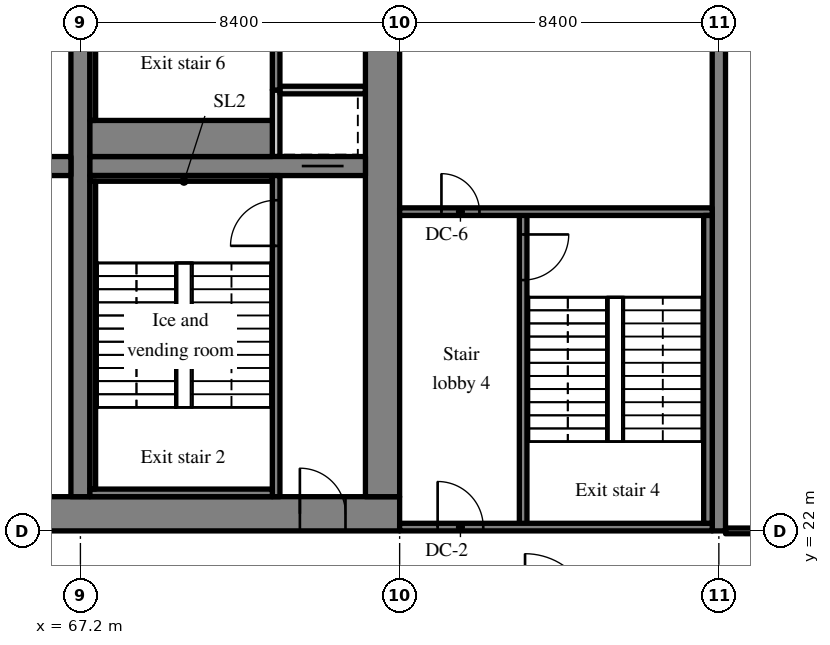
"""IFC4 building model, lengths in metres.
Left out: names, types, materials, properties, quantities, classifications, styles, units other than length and angle.
Written with IfcOpenShell. Run it as: python <this file> out.ifc"""

import sys

from ifc_helpers import new_model, si_unit, direction, frame, frame_2d, origin, place, context, subcontext, project, spatial, rectangle, extrude, source, transform, mapped, element, fill, save


model = new_model("IFC4")
c1 = context("Model", 3, precision=1e-05, world=origin(), true_north=direction((0.0, 1.0)))
c2 = subcontext(c1, "Body", "Model", "MODEL_VIEW")
j1 = project(units=[si_unit("LENGTHUNIT", "METRE"), si_unit("PLANEANGLEUNIT", "RADIAN")], contexts=[c1])
p1 = place(None, origin())
s1 = spatial("IfcSite", under=j1, at=p1, CompositionType="ELEMENT")
p2 = place(p1, origin())
s2 = spatial("IfcBuilding", under=s1, at=p2, CompositionType="ELEMENT")
p3 = place(p2, frame((0.0, 0.0, 86.4)))
s3 = spatial("IfcBuildingStorey", under=s2, at=p3, CompositionType="ELEMENT", Elevation=86.4)
m1 = source(origin(), c2, "Body", "SweptSolid", [
    extrude(rectangle(XDim=50.4, YDim=0.9, at=frame_2d((25.2, 0.0))), origin(), (0.0, 0.0, 1.0), 4.72),
])
p4 = place(p3, frame((25.2, 22.45, 0.0), z_axis=(0.0, 0.0, 1.0), x_axis=(1.0, 0.0, 0.0)))
e1 = element("IfcWall", 1, at=p4, inside=s3, PredefinedType="SHEAR", context=c2, shape_type="MappedRepresentation", body=[
    mapped(m1, transform((0.0, 0.0, 0.0), scale=1.0)),
])
m2 = source(origin(), c2, "Body", "SweptSolid", [
    extrude(rectangle(XDim=1.8, YDim=2.1, at=frame_2d((0.9, 1.05))), frame((0.0, 0.46, 0.0), z_axis=(0.0, -1.0, 0.0), x_axis=(1.0, 0.0, 0.0)), (0.0, 0.0, 1.0), 0.92),
])
p5 = place(p4, frame((15.9, 0.0, 0.0)))
e2 = element("IfcOpeningElement", 2, at=p5, cuts=e1, PredefinedType="OPENING", context=c2, shape_type="MappedRepresentation", body=[
    mapped(m2, transform((0.0, 0.0, 0.0), scale=1.0)),
])
m3 = source(origin(), c2, "Body", "SweptSolid", [
    extrude(rectangle(XDim=1.2, YDim=2.1, at=frame_2d((0.6, 1.05))), frame((0.0, 0.46, 0.0), z_axis=(0.0, -1.0, 0.0), x_axis=(1.0, 0.0, 0.0)), (0.0, 0.0, 1.0), 0.92),
])
p6 = place(p4, frame((26.975, 0.0, 0.0)))
e3 = element("IfcOpeningElement", 3, at=p6, cuts=e1, PredefinedType="OPENING", context=c2, shape_type="MappedRepresentation", body=[
    mapped(m3, transform((0.0, 0.0, 0.0), scale=1.0)),
])
m4 = source(origin(), c2, "Body", "SweptSolid", [
    extrude(rectangle(XDim=0.9, YDim=2.1, at=frame_2d((0.45, 1.05))), frame((0.0, 0.46, 0.0), z_axis=(0.0, -1.0, 0.0), x_axis=(1.0, 0.0, 0.0)), (0.0, 0.0, 1.0), 0.92),
])
p7 = place(p4, frame((34.5, 0.0, 0.0)))
e4 = element("IfcOpeningElement", 4, at=p7, cuts=e1, PredefinedType="OPENING", context=c2, shape_type="MappedRepresentation", body=[
    mapped(m4, transform((0.0, 0.0, 0.0), scale=1.0)),
])
p8 = place(p4, frame((31.5, 0.0, 0.0)))
e5 = element("IfcOpeningElement", 5, at=p8, cuts=e1, PredefinedType="OPENING", context=c2, shape_type="MappedRepresentation", body=[
    mapped(m4, transform((0.0, 0.0, 0.0), scale=1.0)),
])
p9 = place(p4, frame((39.788, 0.0, 0.0)))
e6 = element("IfcOpeningElement", 6, at=p9, cuts=e1, PredefinedType="OPENING", context=c2, shape_type="MappedRepresentation", body=[
    mapped(m4, transform((0.0, 0.0, 0.0), scale=1.0)),
])
p10 = place(p4, frame((36.762, 0.0, 0.0)))
e7 = element("IfcOpeningElement", 7, at=p10, cuts=e1, PredefinedType="OPENING", context=c2, shape_type="MappedRepresentation", body=[
    mapped(m4, transform((0.0, 0.0, 0.0), scale=1.0)),
])
p11 = place(p4, frame((6.45, 0.0, 0.0)))
e8 = element("IfcOpeningElement", 8, at=p11, cuts=e1, PredefinedType="OPENING", context=c2, shape_type="MappedRepresentation", body=[
    mapped(m3, transform((0.0, 0.0, 0.0), scale=1.0)),
])
p12 = place(p4, frame((47.775, 0.0, 0.0)))
e9 = element("IfcOpeningElement", 9, at=p12, cuts=e1, PredefinedType="OPENING", context=c2, shape_type="MappedRepresentation", body=[
    mapped(m3, transform((0.0, 0.0, 0.0), scale=1.0)),
])
m5 = source(origin(), c2, "Body", "SweptSolid", [
    extrude(rectangle(XDim=18.2, YDim=0.9, at=frame_2d((9.1, 0.0))), origin(), (0.0, 0.0, 1.0), 4.72),
])
p13 = place(p3, frame((75.15, 22.9, 0.0), z_axis=(0.0, 0.0, 1.0), x_axis=(0.0, 1.0, 0.0)))
e10 = element("IfcWall", 10, at=p13, inside=s3, PredefinedType="SHEAR", context=c2, shape_type="MappedRepresentation", body=[
    mapped(m5, transform((0.0, 0.0, 0.0), scale=1.0)),
])
p14 = place(p13, frame((12.5, 0.0, 0.0)))
e11 = element("IfcOpeningElement", 11, at=p14, cuts=e10, PredefinedType="OPENING", context=c2, shape_type="MappedRepresentation", body=[
    mapped(m3, transform((0.0, 0.0, 0.0), scale=1.0)),
])
m6 = source(origin(), c2, "Body", "SweptSolid", [
    extrude(rectangle(XDim=18.2, YDim=0.5, at=frame_2d((9.1, 0.0))), origin(), (0.0, 0.0, 1.0), 4.72),
])
p15 = place(p3, frame((67.2, 22.9, 0.0), z_axis=(0.0, 0.0, 1.0), x_axis=(0.0, 1.0, 0.0)))
e12 = element("IfcWall", 12, at=p15, inside=s3, PredefinedType="SHEAR", context=c2, shape_type="MappedRepresentation", body=[
    mapped(m6, transform((0.0, 0.0, 0.0), scale=1.0)),
])
m7 = source(origin(), c2, "Body", "SweptSolid", [
    extrude(rectangle(XDim=16.3, YDim=0.5, at=frame_2d((8.15, 0.0))), origin(), (0.0, 0.0, 1.0), 4.72),
])
p16 = place(p3, frame((50.65, 31.6, 0.0), z_axis=(0.0, 0.0, 1.0), x_axis=(1.0, 0.0, 0.0)))
e13 = element("IfcWall", 13, at=p16, inside=s3, PredefinedType="SHEAR", context=c2, shape_type="MappedRepresentation", body=[
    mapped(m7, transform((0.0, 0.0, 0.0), scale=1.0)),
])
m8 = source(origin(), c2, "Body", "SweptSolid", [
    extrude(rectangle(XDim=1.0, YDim=2.1, at=frame_2d((0.5, 1.05))), frame((0.0, 0.26, 0.0), z_axis=(0.0, -1.0, 0.0), x_axis=(1.0, 0.0, 0.0)), (0.0, 0.0, 1.0), 0.52),
])
p17 = place(p16, frame((0.575, 0.0, 0.0)))
e14 = element("IfcOpeningElement", 14, at=p17, cuts=e13, PredefinedType="OPENING", context=c2, shape_type="MappedRepresentation", body=[
    mapped(m8, transform((0.0, 0.0, 0.0), scale=1.0)),
])
m9 = source(origin(), c2, "Body", "SweptSolid", [
    extrude(rectangle(XDim=7.25, YDim=0.5, at=frame_2d((3.625, 0.0))), origin(), (0.0, 0.0, 1.0), 4.72),
])
p18 = place(p3, frame((67.45, 31.6, 0.0), z_axis=(0.0, 0.0, 1.0), x_axis=(1.0, 0.0, 0.0)))
e15 = element("IfcWall", 15, at=p18, inside=s3, PredefinedType="SHEAR", context=c2, shape_type="MappedRepresentation", body=[
    mapped(m9, transform((0.0, 0.0, 0.0), scale=1.0)),
])
m10 = source(origin(), c2, "Body", "SweptSolid", [
    extrude(rectangle(XDim=1.1, YDim=2.1, at=frame_2d((0.55, 1.05))), frame((0.0, 0.26, 0.0), z_axis=(0.0, -1.0, 0.0), x_axis=(1.0, 0.0, 0.0)), (0.0, 0.0, 1.0), 0.52),
])
p19 = place(p18, frame((5.575, 0.0, 0.0)))
e16 = element("IfcOpeningElement", 16, at=p19, cuts=e15, PredefinedType="OPENING", context=c2, shape_type="MappedRepresentation", body=[
    mapped(m10, transform((0.0, 0.0, 0.0), scale=1.0)),
])
m11 = source(origin(), c2, "Body", "SweptSolid", [
    extrude(rectangle(XDim=20.0, YDim=0.35, at=frame_2d((10.0, 0.0))), origin(), (0.0, 0.0, 1.0), 4.72),
])
p20 = place(p3, frame((84.0, 22.0, 0.0), z_axis=(0.0, 0.0, 1.0), x_axis=(0.0, 1.0, 0.0)))
e17 = element("IfcWall", 17, at=p20, inside=s3, PredefinedType="SHEAR", context=c2, shape_type="MappedRepresentation", body=[
    mapped(m11, transform((0.0, 0.0, 0.0), scale=1.0)),
])
m12 = source(origin(), c2, "Body", "SweptSolid", [
    extrude(rectangle(XDim=8.45, YDim=0.2, at=frame_2d((4.225, 0.0))), origin(), (0.0, 0.0, 1.0), 4.72),
])
p21 = place(p3, frame((72.35, 22.9, 0.0), z_axis=(0.0, 0.0, 1.0), x_axis=(0.0, 1.0, 0.0)))
e18 = element("IfcWall", 18, at=p21, inside=s3, PredefinedType="SOLIDWALL", context=c2, shape_type="MappedRepresentation", body=[
    mapped(m12, transform((0.0, 0.0, 0.0), scale=1.0)),
])
m13 = source(origin(), c2, "Body", "SweptSolid", [
    extrude(rectangle(XDim=1.2, YDim=2.1, at=frame_2d((0.6, 1.05))), frame((0.0, 0.11, 0.0), z_axis=(0.0, -1.0, 0.0), x_axis=(1.0, 0.0, 0.0)), (0.0, 0.0, 1.0), 0.22),
])
p22 = place(p21, frame((6.6, 0.0, 0.0)))
e19 = element("IfcOpeningElement", 19, at=p22, cuts=e18, PredefinedType="OPENING", context=c2, shape_type="MappedRepresentation", body=[
    mapped(m13, transform((0.0, 0.0, 0.0), scale=1.0)),
])
m14 = source(origin(), c2, "Body", "SweptSolid", [
    extrude(rectangle(XDim=1.75, YDim=0.2, at=frame_2d((0.875, 0.0))), origin(), (0.0, 0.0, 1.0), 4.72),
])
p23 = place(p3, frame((72.35, 31.85, 0.0), z_axis=(0.0, 0.0, 1.0), x_axis=(0.0, 1.0, 0.0)))
e20 = element("IfcWall", 20, at=p23, inside=s3, PredefinedType="SOLIDWALL", context=c2, shape_type="MappedRepresentation", body=[
    mapped(m14, transform((0.0, 0.0, 0.0), scale=1.0)),
])
m15 = source(origin(), c2, "Body", "SweptSolid", [
    extrude(rectangle(XDim=2.25, YDim=0.2, at=frame_2d((1.125, 0.0))), origin(), (0.0, 0.0, 1.0), 4.72),
])
p24 = place(p3, frame((72.45, 33.6, 0.0), z_axis=(0.0, 0.0, 1.0), x_axis=(1.0, 0.0, 0.0)))
e21 = element("IfcWall", 21, at=p24, inside=s3, PredefinedType="SOLIDWALL", context=c2, shape_type="MappedRepresentation", body=[
    mapped(m15, transform((0.0, 0.0, 0.0), scale=1.0)),
])
m16 = source(origin(), c2, "Body", "SweptSolid", [
    extrude(rectangle(XDim=7.5, YDim=0.2, at=frame_2d((3.75, 0.0))), origin(), (0.0, 0.0, 1.0), 4.72),
])
p25 = place(p3, frame((72.35, 33.6, 0.0), z_axis=(0.0, 0.0, 1.0), x_axis=(0.0, 1.0, 0.0)))
e22 = element("IfcWall", 22, at=p25, inside=s3, PredefinedType="SOLIDWALL", context=c2, shape_type="MappedRepresentation", body=[
    mapped(m16, transform((0.0, 0.0, 0.0), scale=1.0)),
])
m17 = source(origin(), c2, "Body", "SweptSolid", [
    extrude(rectangle(XDim=1.8, YDim=2.1, at=frame_2d((0.9, 1.05))), frame((0.0, 0.11, 0.0), z_axis=(0.0, -1.0, 0.0), x_axis=(1.0, 0.0, 0.0)), (0.0, 0.0, 1.0), 0.22),
])
p26 = place(p25, frame((5.3, 0.0, 0.0)))
e23 = element("IfcOpeningElement", 23, at=p26, cuts=e22, PredefinedType="OPENING", context=c2, shape_type="MappedRepresentation", body=[
    mapped(m17, transform((0.0, 0.0, 0.0), scale=1.0)),
])
m18 = source(origin(), c2, "Body", "SweptSolid", [
    extrude(rectangle(XDim=8.3, YDim=0.2, at=frame_2d((4.15, 0.0))), origin(), (0.0, 0.0, 1.0), 4.72),
])
p27 = place(p3, frame((78.85, 22.1, 0.0), z_axis=(0.0, 0.0, 1.0), x_axis=(0.0, 1.0, 0.0)))
e24 = element("IfcWall", 24, at=p27, inside=s3, PredefinedType="SOLIDWALL", context=c2, shape_type="MappedRepresentation", body=[
    mapped(m18, transform((0.0, 0.0, 0.0), scale=1.0)),
])
p28 = place(p27, frame((6.5, 0.0, 0.0)))
e25 = element("IfcOpeningElement", 25, at=p28, cuts=e24, PredefinedType="OPENING", context=c2, shape_type="MappedRepresentation", body=[
    mapped(m13, transform((0.0, 0.0, 0.0), scale=1.0)),
])
m19 = source(origin(), c2, "Body", "SweptSolid", [
    extrude(rectangle(XDim=8.225, YDim=0.2, at=frame_2d((4.112, 0.0))), origin(), (0.0, 0.0, 1.0), 4.72),
])
p29 = place(p3, frame((83.825, 22.1, 0.0), z_axis=(0.0, 0.0, 1.0), x_axis=(-1.0, 0.0, 0.0)))
e26 = element("IfcWall", 26, at=p29, inside=s3, PredefinedType="SOLIDWALL", context=c2, shape_type="MappedRepresentation", body=[
    mapped(m19, transform((0.0, 0.0, 0.0), scale=1.0)),
])
p30 = place(p29, frame((6.025, 0.0, 0.0)))
e27 = element("IfcOpeningElement", 27, at=p30, cuts=e26, PredefinedType="OPENING", context=c2, shape_type="MappedRepresentation", body=[
    mapped(m13, transform((0.0, 0.0, 0.0), scale=1.0)),
])
p31 = place(p3, frame((83.825, 30.4, 0.0), z_axis=(0.0, 0.0, 1.0), x_axis=(-1.0, 0.0, 0.0)))
e28 = element("IfcWall", 28, at=p31, inside=s3, PredefinedType="SOLIDWALL", context=c2, shape_type="MappedRepresentation", body=[
    mapped(m19, transform((0.0, 0.0, 0.0), scale=1.0)),
])
m20 = source(origin(), c2, "Body", "SweptSolid", [
    extrude(rectangle(XDim=1.0, YDim=2.1, at=frame_2d((0.5, 1.05))), frame((0.0, 0.11, 0.0), z_axis=(0.0, -1.0, 0.0), x_axis=(1.0, 0.0, 0.0)), (0.0, 0.0, 1.0), 0.22),
])
p32 = place(p31, frame((6.125, 0.0, 0.0)))
e29 = element("IfcOpeningElement", 29, at=p32, cuts=e28, PredefinedType="OPENING", context=c2, shape_type="MappedRepresentation", body=[
    mapped(m20, transform((0.0, 0.0, 0.0), scale=1.0)),
])
m21 = source(origin(), c2, "Body", "SweptSolid", [
    extrude(rectangle(XDim=4.8, YDim=0.2, at=frame_2d((2.4, 0.0))), origin(), (0.0, 0.0, 1.0), 4.72),
])
p33 = place(p3, frame((67.45, 23.0, 0.0), z_axis=(0.0, 0.0, 1.0), x_axis=(1.0, 0.0, 0.0)))
e30 = element("IfcWall", 30, at=p33, inside=s3, PredefinedType="SOLIDWALL", context=c2, shape_type="MappedRepresentation", body=[
    mapped(m21, transform((0.0, 0.0, 0.0), scale=1.0)),
])
m22 = source(origin(), c2, "Body", "SweptSolid", [
    extrude(rectangle(XDim=4.8, YDim=0.15, at=frame_2d((2.4, 0.0))), origin(), (0.0, 0.0, 1.0), 4.72),
])
p34 = place(p3, frame((67.45, 31.275, 0.0), z_axis=(0.0, 0.0, 1.0), x_axis=(1.0, 0.0, 0.0)))
e31 = element("IfcWall", 31, at=p34, inside=s3, PredefinedType="SOLIDWALL", context=c2, shape_type="MappedRepresentation", body=[
    mapped(m22, transform((0.0, 0.0, 0.0), scale=1.0)),
])
m23 = source(origin(), c2, "Body", "SweptSolid", [
    extrude(rectangle(XDim=8.1, YDim=0.15, at=frame_2d((4.05, 0.0))), origin(), (0.0, 0.0, 1.0), 4.72),
])
p35 = place(p3, frame((67.525, 23.1, 0.0), z_axis=(0.0, 0.0, 1.0), x_axis=(0.0, 1.0, 0.0)))
e32 = element("IfcWall", 32, at=p35, inside=s3, PredefinedType="SOLIDWALL", context=c2, shape_type="MappedRepresentation", body=[
    mapped(m23, transform((0.0, 0.0, 0.0), scale=1.0)),
])
m24 = source(origin(), c2, "Body", "SweptSolid", [
    extrude(rectangle(XDim=4.8, YDim=0.95, at=frame_2d((2.4, 0.0))), origin(), (0.0, 0.0, 1.0), 4.72),
])
p36 = place(p3, frame((67.45, 32.325, 0.0), z_axis=(0.0, 0.0, 1.0), x_axis=(1.0, 0.0, 0.0)))
e33 = element("IfcWall", 33, at=p36, inside=s3, PredefinedType="SOLIDWALL", context=c2, shape_type="MappedRepresentation", body=[
    mapped(m24, transform((0.0, 0.0, 0.0), scale=1.0)),
])
p37 = place(p3, frame((67.525, 32.8, 0.0), z_axis=(0.0, 0.0, 1.0), x_axis=(0.0, 1.0, 0.0)))
e34 = element("IfcWall", 34, at=p37, inside=s3, PredefinedType="SOLIDWALL", context=c2, shape_type="MappedRepresentation", body=[
    mapped(m23, transform((0.0, 0.0, 0.0), scale=1.0)),
])
m25 = source(origin(), c2, "Body", "SweptSolid", [
    extrude(rectangle(XDim=8.1, YDim=0.225, at=frame_2d((4.05, 0.0))), origin(), (0.0, 0.0, 1.0), 4.72),
])
p38 = place(p3, frame((83.713, 22.2, 0.0), z_axis=(0.0, 0.0, 1.0), x_axis=(0.0, 1.0, 0.0)))
e35 = element("IfcWall", 35, at=p38, inside=s3, PredefinedType="SOLIDWALL", context=c2, shape_type="MappedRepresentation", body=[
    mapped(m25, transform((0.0, 0.0, 0.0), scale=1.0)),
])
m26 = source(origin(), c2, "Body", "SweptSolid", [
    extrude(rectangle(XDim=8.05, YDim=0.15, at=frame_2d((4.025, 0.0))), origin(), (0.0, 0.0, 1.0), 4.02),
])
p39 = place(p3, frame((84.175, 22.0, 0.0), z_axis=(0.0, 0.0, 1.0), x_axis=(1.0, 0.0, 0.0)))
e36 = element("IfcWall", 36, at=p39, inside=s3, PredefinedType="PARTITIONING", context=c2, shape_type="MappedRepresentation", body=[
    mapped(m26, transform((0.0, 0.0, 0.0), scale=1.0)),
])
m27 = source(origin(), c2, "Body", "SweptSolid", [
    extrude(rectangle(XDim=1.8, YDim=2.1, at=frame_2d((0.9, 1.05))), frame((0.0, 0.085, 0.0), z_axis=(0.0, -1.0, 0.0), x_axis=(1.0, 0.0, 0.0)), (0.0, 0.0, 1.0), 0.17),
])
p40 = place(p39, frame((3.125, 0.0, 0.0)))
e37 = element("IfcOpeningElement", 37, at=p40, cuts=e36, PredefinedType="OPENING", context=c2, shape_type="MappedRepresentation", body=[
    mapped(m27, transform((0.0, 0.0, 0.0), scale=1.0)),
])
m28 = source(origin(), c2, "Body", "SweptSolid", [
    extrude(rectangle(XDim=1.2, YDim=2.1, at=frame_2d((0.6, 1.05))), frame((0.0, 0.025, 0.0), z_axis=(0.0, -1.0, 0.0), x_axis=(1.0, 0.0, 0.0)), (0.0, 0.0, 1.0), 0.05),
])
p41 = place(p22, origin())
e38 = element("IfcDoor", 38, at=p41, inside=s3, OperationType="SINGLE_SWING_LEFT", PredefinedType="DOOR", context=c2, shape_type="MappedRepresentation", body=[
    mapped(m28, transform((0.0, 0.0, 0.0), scale=1.0)),
])
fill(e19, e38)
m29 = source(origin(), c2, "Body", "SweptSolid", [
    extrude(rectangle(XDim=1.2, YDim=2.1, at=frame_2d((0.6, 1.05))), frame((0.0, 0.375, 0.0), z_axis=(0.0, -1.0, 0.0), x_axis=(1.0, 0.0, 0.0)), (0.0, 0.0, 1.0), 0.05),
])
p42 = place(p12, origin())
e39 = element("IfcDoor", 39, at=p42, inside=s3, OperationType="SINGLE_SWING_LEFT", PredefinedType="DOOR", context=c2, shape_type="MappedRepresentation", body=[
    mapped(m29, transform((0.0, 0.0, 0.0), scale=1.0)),
])
fill(e9, e39)
m30 = source(origin(), c2, "Body", "SweptSolid", [
    extrude(rectangle(XDim=1.1, YDim=2.1, at=frame_2d((0.55, 1.05))), frame((0.0, 0.025, 0.0), z_axis=(0.0, -1.0, 0.0), x_axis=(1.0, 0.0, 0.0)), (0.0, 0.0, 1.0), 0.05),
])
p43 = place(p19, origin())
e40 = element("IfcDoor", 40, at=p43, inside=s3, OperationType="SLIDING_TO_RIGHT", PredefinedType="DOOR", context=c2, shape_type="MappedRepresentation", body=[
    mapped(m30, transform((0.0, 0.0, 0.0), scale=1.0)),
])
fill(e16, e40)
p44 = place(p28, origin())
e41 = element("IfcDoor", 41, at=p44, inside=s3, OperationType="SINGLE_SWING_RIGHT", PredefinedType="DOOR", context=c2, shape_type="MappedRepresentation", body=[
    mapped(m28, transform((0.0, 0.0, 0.0), scale=1.0)),
])
fill(e25, e41)
p45 = place(p30, origin())
e42 = element("IfcDoor", 42, at=p45, inside=s3, OperationType="SINGLE_SWING_RIGHT", PredefinedType="DOOR", context=c2, shape_type="MappedRepresentation", body=[
    mapped(m28, transform((0.0, 0.0, 0.0), scale=1.0)),
])
fill(e27, e42)
m31 = source(origin(), c2, "Body", "SweptSolid", [
    extrude(rectangle(XDim=1.0, YDim=2.1, at=frame_2d((0.5, 1.05))), frame((0.0, 0.025, 0.0), z_axis=(0.0, -1.0, 0.0), x_axis=(1.0, 0.0, 0.0)), (0.0, 0.0, 1.0), 0.05),
])
p46 = place(p32, origin())
e43 = element("IfcDoor", 43, at=p46, inside=s3, OperationType="SINGLE_SWING_RIGHT", PredefinedType="DOOR", context=c2, shape_type="MappedRepresentation", body=[
    mapped(m31, transform((0.0, 0.0, 0.0), scale=1.0)),
])
fill(e29, e43)
save(model, sys.argv[1])
